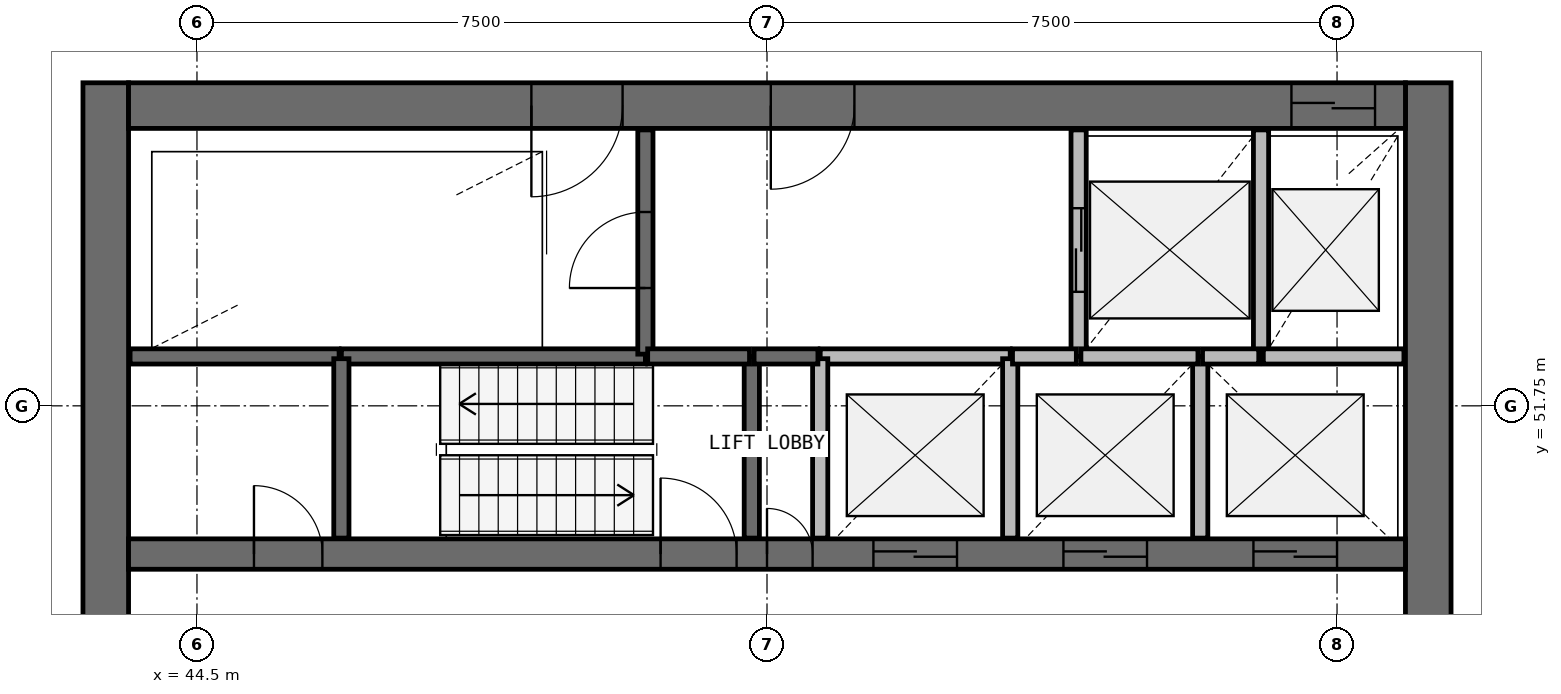
"""IFC4 building model, lengths in metres.
Left out: names, types, materials, properties, quantities, classifications, styles, units other than length and angle.
Written with IfcOpenShell. Run it as: python <this file> out.ifc"""

import sys

from ifc_helpers import new_model, si_unit, direction, frame, frame_2d, origin, place, context, subcontext, project, spatial, rectangle, extrude, source, transform, mapped, element, fill, save


model = new_model("IFC4")
c1 = context("Model", 3, precision=1e-05, world=origin(), true_north=direction((0.0, 1.0)))
c2 = subcontext(c1, "Body", "Model", "MODEL_VIEW")
j1 = project(units=[si_unit("LENGTHUNIT", "METRE"), si_unit("PLANEANGLEUNIT", "RADIAN")], contexts=[c1])
p1 = place(None, origin())
s1 = spatial("IfcSite", under=j1, at=p1, CompositionType="ELEMENT")
p2 = place(p1, origin())
s2 = spatial("IfcBuilding", under=s1, at=p2, CompositionType="ELEMENT")
p3 = place(p2, frame((0.0, 0.0, 265.7)))
s3 = spatial("IfcBuildingStorey", under=s2, at=p3, CompositionType="ELEMENT", Elevation=265.7)
p4 = place(p3, frame((60.7, 40.0, 0.0), z_axis=(0.0, 0.0, 1.0), x_axis=(0.0, 1.0, 0.0)))
e1 = element("IfcWall", 1, at=p4, inside=s3, PredefinedType="SHEAR", context=c2, shape_type="SweptSolid", body=[
    extrude(rectangle(XDim=16.0, YDim=0.6, at=frame_2d((8.0, 0.0))), origin(), (0.0, 0.0, 1.0), 3.9),
])
p5 = place(p4, frame((7.1, 0.0, 0.0)))
e2 = element("IfcOpeningElement", 2, at=p5, cuts=e1, PredefinedType="OPENING", context=c2, shape_type="SweptSolid", body=[
    extrude(rectangle(XDim=1.8, YDim=2.1, at=frame_2d((0.9, 1.05))), frame((0.0, 0.31, 0.0), z_axis=(0.0, -1.0, 0.0), x_axis=(1.0, 0.0, 0.0)), (0.0, 0.0, 1.0), 0.62),
])
p6 = place(p3, frame((43.3, 56.0, 0.0), z_axis=(0.0, 0.0, 1.0), x_axis=(0.0, -1.0, 0.0)))
e3 = element("IfcWall", 3, at=p6, inside=s3, PredefinedType="SHEAR", context=c2, shape_type="SweptSolid", body=[
    extrude(rectangle(XDim=16.0, YDim=0.6, at=frame_2d((8.0, 0.0))), origin(), (0.0, 0.0, 1.0), 3.9),
])
p7 = place(p6, frame((7.1, 0.0, 0.0)))
e4 = element("IfcOpeningElement", 4, at=p7, cuts=e3, PredefinedType="OPENING", context=c2, shape_type="SweptSolid", body=[
    extrude(rectangle(XDim=1.8, YDim=2.1, at=frame_2d((0.9, 1.05))), frame((0.0, 0.31, 0.0), z_axis=(0.0, -1.0, 0.0), x_axis=(1.0, 0.0, 0.0)), (0.0, 0.0, 1.0), 0.62),
])
p8 = place(p3, frame((60.4, 55.7, 0.0), z_axis=(0.0, 0.0, 1.0), x_axis=(-1.0, 0.0, 0.0)))
e5 = element("IfcWall", 5, at=p8, inside=s3, PredefinedType="SHEAR", context=c2, shape_type="SweptSolid", body=[
    extrude(rectangle(XDim=16.8, YDim=0.6, at=frame_2d((8.4, 0.0))), origin(), (0.0, 0.0, 1.0), 3.9),
])
p9 = place(p8, frame((0.4, 0.0, 0.0)))
e6 = element("IfcOpeningElement", 6, at=p9, cuts=e5, PredefinedType="OPENING", context=c2, shape_type="SweptSolid", body=[
    extrude(rectangle(XDim=1.1, YDim=2.1, at=frame_2d((0.55, 1.05))), frame((0.0, 0.31, 0.0), z_axis=(0.0, -1.0, 0.0), x_axis=(1.0, 0.0, 0.0)), (0.0, 0.0, 1.0), 0.62),
])
p10 = place(p8, frame((10.3, 0.0, 0.0)))
e7 = element("IfcOpeningElement", 7, at=p10, cuts=e5, PredefinedType="OPENING", context=c2, shape_type="SweptSolid", body=[
    extrude(rectangle(XDim=1.2, YDim=2.1, at=frame_2d((0.6, 1.05))), frame((0.0, 0.31, 0.0), z_axis=(0.0, -1.0, 0.0), x_axis=(1.0, 0.0, 0.0)), (0.0, 0.0, 1.0), 0.62),
])
p11 = place(p8, frame((7.25, 0.0, 0.0)))
e8 = element("IfcOpeningElement", 8, at=p11, cuts=e5, PredefinedType="OPENING", context=c2, shape_type="SweptSolid", body=[
    extrude(rectangle(XDim=1.1, YDim=2.1, at=frame_2d((0.55, 1.05))), frame((0.0, 0.31, 0.0), z_axis=(0.0, -1.0, 0.0), x_axis=(1.0, 0.0, 0.0)), (0.0, 0.0, 1.0), 0.62),
])
p12 = place(p3, frame((43.6, 49.8, 0.0), z_axis=(0.0, 0.0, 1.0), x_axis=(1.0, 0.0, 0.0)))
e9 = element("IfcWall", 9, at=p12, inside=s3, PredefinedType="SHEAR", context=c2, shape_type="SweptSolid", body=[
    extrude(rectangle(XDim=16.8, YDim=0.4, at=frame_2d((8.4, 0.0))), origin(), (0.0, 0.0, 1.0), 3.9),
])
p13 = place(p12, frame((9.8, 0.0, 0.0)))
e10 = element("IfcOpeningElement", 10, at=p13, cuts=e9, PredefinedType="OPENING", context=c2, shape_type="SweptSolid", body=[
    extrude(rectangle(XDim=1.1, YDim=2.1, at=frame_2d((0.55, 1.05))), frame((0.0, 0.21, 0.0), z_axis=(0.0, -1.0, 0.0), x_axis=(1.0, 0.0, 0.0)), (0.0, 0.0, 1.0), 0.42),
])
p14 = place(p12, frame((12.3, 0.0, 0.0)))
e11 = element("IfcOpeningElement", 11, at=p14, cuts=e9, PredefinedType="OPENING", context=c2, shape_type="SweptSolid", body=[
    extrude(rectangle(XDim=1.1, YDim=2.1, at=frame_2d((0.55, 1.05))), frame((0.0, 0.21, 0.0), z_axis=(0.0, -1.0, 0.0), x_axis=(1.0, 0.0, 0.0)), (0.0, 0.0, 1.0), 0.42),
])
p15 = place(p12, frame((14.8, 0.0, 0.0)))
e12 = element("IfcOpeningElement", 12, at=p15, cuts=e9, PredefinedType="OPENING", context=c2, shape_type="SweptSolid", body=[
    extrude(rectangle(XDim=1.1, YDim=2.1, at=frame_2d((0.55, 1.05))), frame((0.0, 0.21, 0.0), z_axis=(0.0, -1.0, 0.0), x_axis=(1.0, 0.0, 0.0)), (0.0, 0.0, 1.0), 0.42),
])
p16 = place(p12, frame((7.0, 0.0, 0.0)))
e13 = element("IfcOpeningElement", 13, at=p16, cuts=e9, PredefinedType="OPENING", context=c2, shape_type="SweptSolid", body=[
    extrude(rectangle(XDim=1.0, YDim=2.1, at=frame_2d((0.5, 1.05))), frame((0.0, 0.21, 0.0), z_axis=(0.0, -1.0, 0.0), x_axis=(1.0, 0.0, 0.0)), (0.0, 0.0, 1.0), 0.42),
])
p17 = place(p12, frame((8.4, 0.0, 0.0)))
e14 = element("IfcOpeningElement", 14, at=p17, cuts=e9, PredefinedType="OPENING", context=c2, shape_type="SweptSolid", body=[
    extrude(rectangle(XDim=0.6, YDim=2.1, at=frame_2d((0.3, 1.05))), frame((0.0, 0.21, 0.0), z_axis=(0.0, -1.0, 0.0), x_axis=(1.0, 0.0, 0.0)), (0.0, 0.0, 1.0), 0.42),
])
p18 = place(p12, frame((1.65, 0.0, 0.0)))
e15 = element("IfcOpeningElement", 15, at=p18, cuts=e9, PredefinedType="OPENING", context=c2, shape_type="SweptSolid", body=[
    extrude(rectangle(XDim=0.9, YDim=2.1, at=frame_2d((0.45, 1.05))), frame((0.0, 0.21, 0.0), z_axis=(0.0, -1.0, 0.0), x_axis=(1.0, 0.0, 0.0)), (0.0, 0.0, 1.0), 0.42),
])
p19 = place(p3, frame((46.4, 52.4, 0.0), z_axis=(0.0, 0.0, 1.0), x_axis=(1.0, 0.0, 0.0)))
e16 = element("IfcWall", 16, at=p19, inside=s3, PredefinedType="SOLIDWALL", context=c2, shape_type="SweptSolid", body=[
    extrude(rectangle(XDim=4.0, YDim=0.2, at=frame_2d((2.0, 0.0))), origin(), (0.0, 0.0, 1.0), 3.62),
])
p20 = place(p3, frame((50.4, 52.43, 0.0), z_axis=(0.0, 0.0, 1.0), x_axis=(0.0, 1.0, 0.0)))
e17 = element("IfcWall", 17, at=p20, inside=s3, PredefinedType="SOLIDWALL", context=c2, shape_type="SweptSolid", body=[
    extrude(rectangle(XDim=2.95, YDim=0.2, at=frame_2d((1.475, 0.0))), origin(), (0.0, 0.0, 1.0), 2.7),
])
p21 = place(p20, frame((0.87, 0.0, 0.0)))
e18 = element("IfcOpeningElement", 18, at=p21, cuts=e17, PredefinedType="OPENING", context=c2, shape_type="SweptSolid", body=[
    extrude(rectangle(XDim=1.0, YDim=2.1, at=frame_2d((0.5, 1.05))), frame((0.0, 0.11, 0.0), z_axis=(0.0, -1.0, 0.0), x_axis=(1.0, 0.0, 0.0)), (0.0, 0.0, 1.0), 0.22),
])
p22 = place(p3, frame((56.1, 55.38, 0.0), z_axis=(0.0, 0.0, 1.0), x_axis=(0.0, -1.0, 0.0)))
e19 = element("IfcWall", 19, at=p22, inside=s3, PredefinedType="SOLIDWALL", context=c2, shape_type="SweptSolid", body=[
    extrude(rectangle(XDim=2.98, YDim=0.2, at=frame_2d((1.49, 0.0))), origin(), (0.0, 0.0, 1.0), 2.7),
])
p23 = place(p22, frame((1.03, 0.0, 0.0)))
e20 = element("IfcOpeningElement", 20, at=p23, cuts=e19, PredefinedType="OPENING", context=c2, shape_type="SweptSolid", body=[
    extrude(rectangle(XDim=1.1, YDim=2.1, at=frame_2d((0.55, 1.05))), frame((0.0, 0.11, 0.0), z_axis=(0.0, -1.0, 0.0), x_axis=(1.0, 0.0, 0.0)), (0.0, 0.0, 1.0), 0.22),
])
p24 = place(p3, frame((58.5, 52.4, 0.0), z_axis=(0.0, 0.0, 1.0), x_axis=(0.0, 1.0, 0.0)))
e21 = element("IfcWall", 21, at=p24, inside=s3, PredefinedType="SOLIDWALL", context=c2, shape_type="SweptSolid", body=[
    extrude(rectangle(XDim=2.98, YDim=0.2, at=frame_2d((1.49, 0.0))), origin(), (0.0, 0.0, 1.0), 2.7),
])
p25 = place(p3, frame((43.62, 52.4, 0.0), z_axis=(0.0, 0.0, 1.0), x_axis=(1.0, 0.0, 0.0)))
e22 = element("IfcWall", 22, at=p25, inside=s3, PredefinedType="SOLIDWALL", context=c2, shape_type="SweptSolid", body=[
    extrude(rectangle(XDim=2.75, YDim=0.2, at=frame_2d((1.375, 0.0))), origin(), (0.0, 0.0, 1.0), 2.7),
])
p26 = place(p3, frame((55.2, 52.4, 0.0), z_axis=(0.0, 0.0, 1.0), x_axis=(-1.0, 0.0, 0.0)))
e23 = element("IfcWall", 23, at=p26, inside=s3, PredefinedType="SOLIDWALL", context=c2, shape_type="SweptSolid", body=[
    extrude(rectangle(XDim=2.5, YDim=0.2, at=frame_2d((1.25, 0.0))), origin(), (0.0, 0.0, 1.0), 3.62),
])
p27 = place(p3, frame((46.4, 52.37, 0.0), z_axis=(0.0, 0.0, 1.0), x_axis=(0.0, -1.0, 0.0)))
e24 = element("IfcWall", 24, at=p27, inside=s3, PredefinedType="SOLIDWALL", context=c2, shape_type="SweptSolid", body=[
    extrude(rectangle(XDim=2.36, YDim=0.2, at=frame_2d((1.18, 0.0))), origin(), (0.0, 0.0, 1.0), 3.62),
])
p28 = place(p3, frame((51.8, 50.01, 0.0), z_axis=(0.0, 0.0, 1.0), x_axis=(0.0, 1.0, 0.0)))
e25 = element("IfcWall", 25, at=p28, inside=s3, PredefinedType="SOLIDWALL", context=c2, shape_type="SweptSolid", body=[
    extrude(rectangle(XDim=2.39, YDim=0.2, at=frame_2d((1.195, 0.0))), origin(), (0.0, 0.0, 1.0), 3.62),
])
for number, where, z_axis, x_axis in (
    (26, (52.7, 52.37, 0.0), (0.0, 0.0, 1.0), (0.0, -1.0, 0.0)),
    (27, (55.2, 50.01, 0.0), (0.0, 0.0, 1.0), (0.0, 1.0, 0.0)),
):
    element("IfcWall", number, at=place(p3, frame(where, z_axis=z_axis, x_axis=x_axis)), inside=s3, PredefinedType="SOLIDWALL", context=c2, shape_type="SweptSolid", body=[
        extrude(rectangle(XDim=2.36, YDim=0.2, at=frame_2d((1.18, 0.0))), origin(), (0.0, 0.0, 1.0), 3.62),
    ])
p29 = place(p3, frame((57.7, 50.01, 0.0), z_axis=(0.0, 0.0, 1.0), x_axis=(0.0, 1.0, 0.0)))
e28 = element("IfcWall", 28, at=p29, inside=s3, PredefinedType="SOLIDWALL", context=c2, shape_type="SweptSolid", body=[
    extrude(rectangle(XDim=2.39, YDim=0.2, at=frame_2d((1.195, 0.0))), origin(), (0.0, 0.0, 1.0), 3.62),
])
p30 = place(p3, frame((60.38, 52.4, 0.0), z_axis=(0.0, 0.0, 1.0), x_axis=(-1.0, 0.0, 0.0)))
e29 = element("IfcWall", 29, at=p30, inside=s3, PredefinedType="SOLIDWALL", context=c2, shape_type="SweptSolid", body=[
    extrude(rectangle(XDim=1.85, YDim=0.2, at=frame_2d((0.925, 0.0))), origin(), (0.0, 0.0, 1.0), 2.7),
])
p31 = place(p3, frame((57.67, 52.4, 0.0), z_axis=(0.0, 0.0, 1.0), x_axis=(-1.0, 0.0, 0.0)))
e30 = element("IfcWall", 30, at=p31, inside=s3, PredefinedType="SOLIDWALL", context=c2, shape_type="SweptSolid", body=[
    extrude(rectangle(XDim=1.54, YDim=0.2, at=frame_2d((0.77, 0.0))), origin(), (0.0, 0.0, 1.0), 3.62),
])
p32 = place(p3, frame((50.43, 52.4, 0.0), z_axis=(0.0, 0.0, 1.0), x_axis=(1.0, 0.0, 0.0)))
e31 = element("IfcWall", 31, at=p32, inside=s3, PredefinedType="SOLIDWALL", context=c2, shape_type="SweptSolid", body=[
    extrude(rectangle(XDim=1.34, YDim=0.2, at=frame_2d((0.67, 0.0))), origin(), (0.0, 0.0, 1.0), 3.62),
])
p33 = place(p3, frame((51.83, 52.4, 0.0), z_axis=(0.0, 0.0, 1.0), x_axis=(1.0, 0.0, 0.0)))
e32 = element("IfcWall", 32, at=p33, inside=s3, PredefinedType="SOLIDWALL", context=c2, shape_type="SweptSolid", body=[
    extrude(rectangle(XDim=0.84, YDim=0.2, at=frame_2d((0.42, 0.0))), origin(), (0.0, 0.0, 1.0), 3.62),
])
p34 = place(p3, frame((56.07, 52.4, 0.0), z_axis=(0.0, 0.0, 1.0), x_axis=(-1.0, 0.0, 0.0)))
e33 = element("IfcWall", 33, at=p34, inside=s3, PredefinedType="SOLIDWALL", context=c2, shape_type="SweptSolid", body=[
    extrude(rectangle(XDim=0.84, YDim=0.2, at=frame_2d((0.42, 0.0))), origin(), (0.0, 0.0, 1.0), 3.62),
])
p35 = place(p3, frame((58.47, 52.4, 0.0), z_axis=(0.0, 0.0, 1.0), x_axis=(-1.0, 0.0, 0.0)))
e34 = element("IfcWall", 34, at=p35, inside=s3, PredefinedType="SOLIDWALL", context=c2, shape_type="SweptSolid", body=[
    extrude(rectangle(XDim=0.74, YDim=0.2, at=frame_2d((0.37, 0.0))), origin(), (0.0, 0.0, 1.0), 2.7),
])
m1 = source(origin(), c2, "Body", "SweptSolid", [
    extrude(rectangle(XDim=1.1, YDim=2.1, at=frame_2d((0.55, 1.05))), frame((0.0, 0.025, 0.0), z_axis=(0.0, -1.0, 0.0), x_axis=(1.0, 0.0, 0.0)), (0.0, 0.0, 1.0), 0.05),
])
p36 = place(p13, origin())
e35 = element("IfcDoor", 35, at=p36, inside=s3, OperationType="DOUBLE_DOOR_SLIDING", PredefinedType="USERDEFINED", context=c2, shape_type="MappedRepresentation", body=[
    mapped(m1, transform((0.0, 0.0, 0.0), scale=1.0)),
])
fill(e10, e35)
p37 = place(p14, origin())
e36 = element("IfcDoor", 36, at=p37, inside=s3, OperationType="DOUBLE_DOOR_SLIDING", PredefinedType="USERDEFINED", context=c2, shape_type="MappedRepresentation", body=[
    mapped(m1, transform((0.0, 0.0, 0.0), scale=1.0)),
])
fill(e11, e36)
p38 = place(p15, origin())
e37 = element("IfcDoor", 37, at=p38, inside=s3, OperationType="DOUBLE_DOOR_SLIDING", PredefinedType="USERDEFINED", context=c2, shape_type="MappedRepresentation", body=[
    mapped(m1, transform((0.0, 0.0, 0.0), scale=1.0)),
])
fill(e12, e37)
p39 = place(p23, origin())
e38 = element("IfcDoor", 38, at=p39, inside=s3, OperationType="DOUBLE_DOOR_SLIDING", PredefinedType="USERDEFINED", context=c2, shape_type="MappedRepresentation", body=[
    mapped(m1, transform((0.0, 0.0, 0.0), scale=1.0)),
])
fill(e20, e38)
p40 = place(p9, origin())
e39 = element("IfcDoor", 39, at=p40, inside=s3, OperationType="DOUBLE_DOOR_SLIDING", PredefinedType="USERDEFINED", context=c2, shape_type="MappedRepresentation", body=[
    mapped(m1, transform((0.0, 0.0, 0.0), scale=1.0)),
])
fill(e6, e39)
m2 = source(origin(), c2, "Body", "SweptSolid", [
    extrude(rectangle(XDim=1.2, YDim=2.1, at=frame_2d((0.6, 1.05))), frame((0.0, 0.025, 0.0), z_axis=(0.0, -1.0, 0.0), x_axis=(1.0, 0.0, 0.0)), (0.0, 0.0, 1.0), 0.05),
])
p41 = place(p10, origin())
e40 = element("IfcDoor", 40, at=p41, inside=s3, OperationType="SINGLE_SWING_RIGHT", PredefinedType="DOOR", context=c2, shape_type="MappedRepresentation", body=[
    mapped(m2, transform((0.0, 0.0, 0.0), scale=1.0)),
])
fill(e7, e40)
m3 = source(origin(), c2, "Body", "SweptSolid", [
    extrude(rectangle(XDim=1.0, YDim=2.1, at=frame_2d((0.5, 1.05))), frame((0.0, 0.025, 0.0), z_axis=(0.0, -1.0, 0.0), x_axis=(1.0, 0.0, 0.0)), (0.0, 0.0, 1.0), 0.05),
])
p42 = place(p21, origin())
e41 = element("IfcDoor", 41, at=p42, inside=s3, OperationType="SINGLE_SWING_LEFT", PredefinedType="DOOR", context=c2, shape_type="MappedRepresentation", body=[
    mapped(m3, transform((0.0, 0.0, 0.0), scale=1.0)),
])
fill(e18, e41)
m4 = source(origin(), c2, "Body", "SweptSolid", [
    extrude(rectangle(XDim=1.1, YDim=2.1, at=frame_2d((0.55, 1.05))), frame((0.0, 0.025, 0.0), z_axis=(0.0, -1.0, 0.0), x_axis=(1.0, 0.0, 0.0)), (0.0, 0.0, 1.0), 0.05),
])
p43 = place(p11, origin())
e42 = element("IfcDoor", 42, at=p43, inside=s3, OperationType="SINGLE_SWING_RIGHT", PredefinedType="DOOR", context=c2, shape_type="MappedRepresentation", body=[
    mapped(m4, transform((0.0, 0.0, 0.0), scale=1.0)),
])
fill(e8, e42)
p44 = place(p16, origin())
e43 = element("IfcDoor", 43, at=p44, inside=s3, OperationType="SINGLE_SWING_LEFT", PredefinedType="DOOR", context=c2, shape_type="MappedRepresentation", body=[
    mapped(m3, transform((0.0, 0.0, 0.0), scale=1.0)),
])
fill(e13, e43)
m5 = source(origin(), c2, "Body", "SweptSolid", [
    extrude(rectangle(XDim=0.6, YDim=2.1, at=frame_2d((0.3, 1.05))), frame((0.0, 0.025, 0.0), z_axis=(0.0, -1.0, 0.0), x_axis=(1.0, 0.0, 0.0)), (0.0, 0.0, 1.0), 0.05),
])
p45 = place(p17, origin())
e44 = element("IfcDoor", 44, at=p45, inside=s3, OperationType="SINGLE_SWING_LEFT", PredefinedType="DOOR", context=c2, shape_type="MappedRepresentation", body=[
    mapped(m5, transform((0.0, 0.0, 0.0), scale=1.0)),
])
fill(e14, e44)
m6 = source(origin(), c2, "Body", "SweptSolid", [
    extrude(rectangle(XDim=0.9, YDim=2.1, at=frame_2d((0.45, 1.05))), frame((0.0, 0.025, 0.0), z_axis=(0.0, -1.0, 0.0), x_axis=(1.0, 0.0, 0.0)), (0.0, 0.0, 1.0), 0.05),
])
p46 = place(p18, origin())
e45 = element("IfcDoor", 45, at=p46, inside=s3, OperationType="SINGLE_SWING_LEFT", PredefinedType="DOOR", context=c2, shape_type="MappedRepresentation", body=[
    mapped(m6, transform((0.0, 0.0, 0.0), scale=1.0)),
])
fill(e15, e45)
save(model, sys.argv[1])
